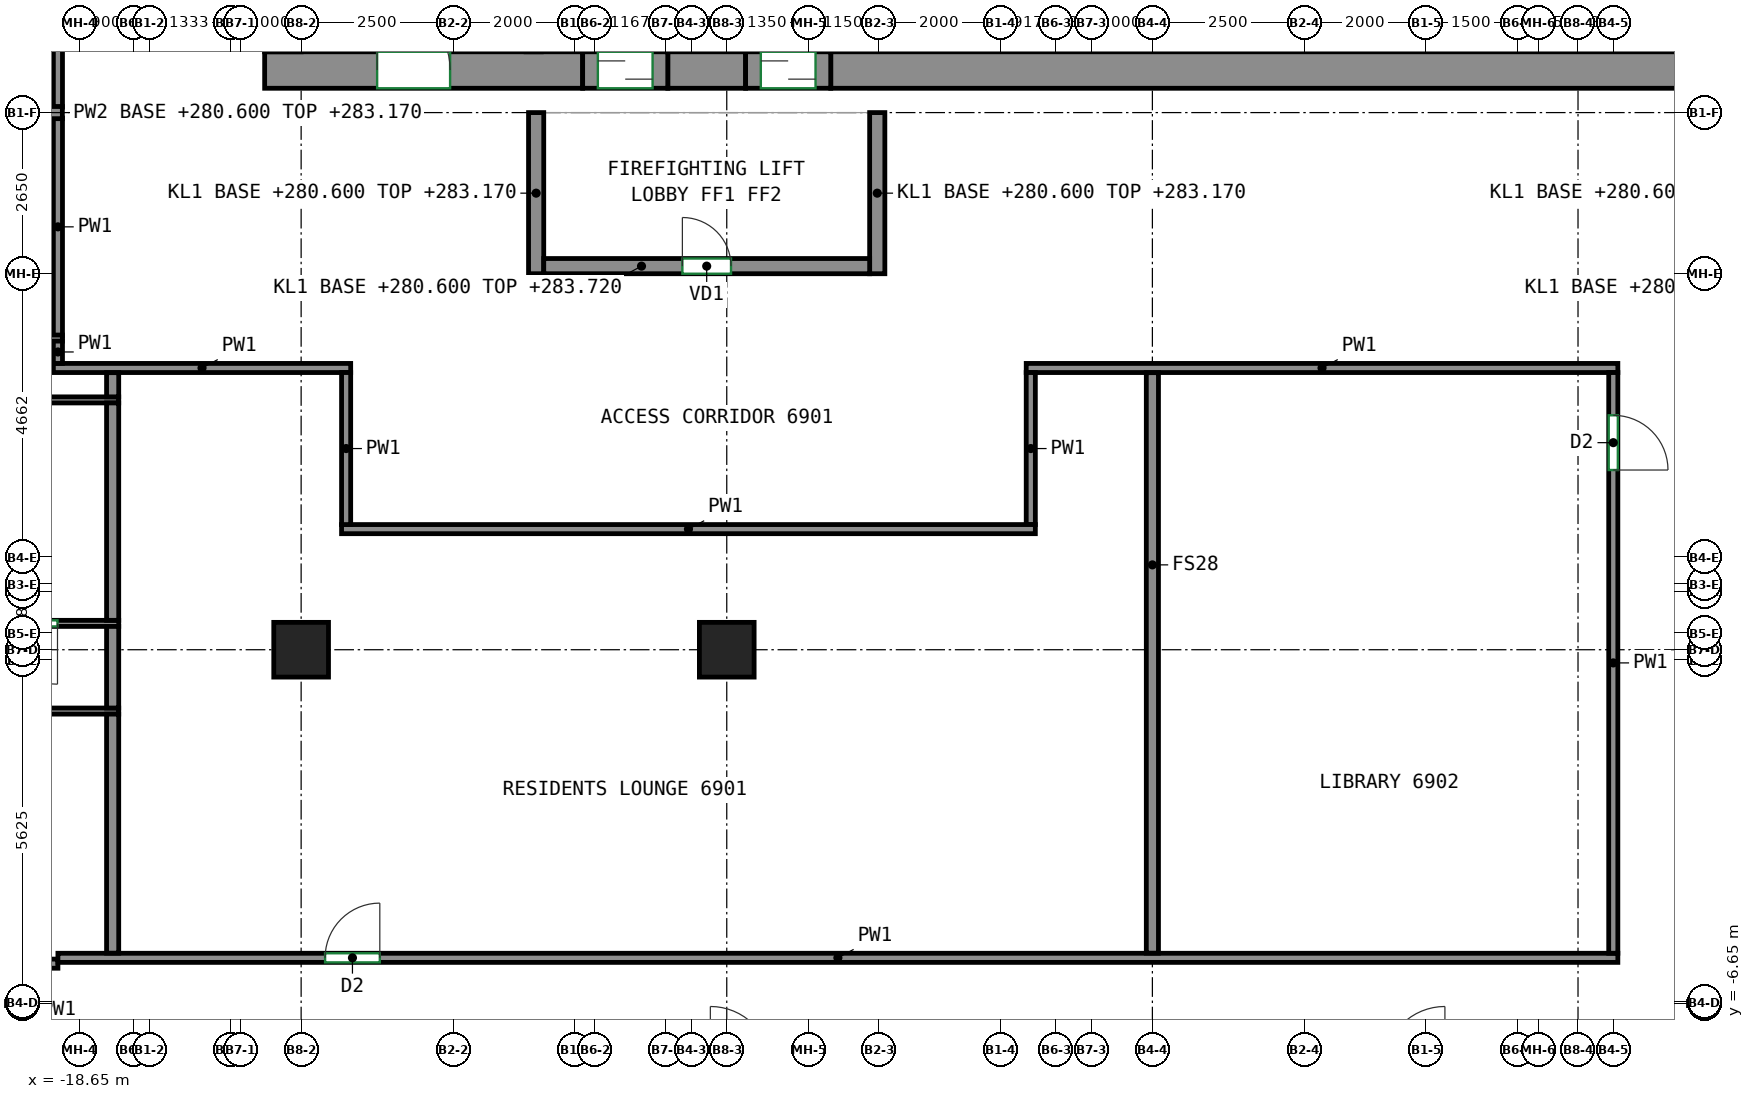
"""IFC4 building model, lengths in metres.
Left out: names, types, materials, properties, quantities, classifications, styles, units other than length and angle.
Written with IfcOpenShell. Run it as: python <this file> out.ifc"""

import sys

from ifc_helpers import new_model, si_unit, direction, frame, frame_2d, origin, origin_2d, place, context, subcontext, project, spatial, rectangle, extrude, source, transform, mapped, element, fill, save


model = new_model("IFC4")
c1 = context("Model", 3, precision=1e-05, world=origin(), true_north=direction((0.0, 1.0)))
c2 = subcontext(c1, "Body", "Model", "MODEL_VIEW")
j1 = project(units=[si_unit("LENGTHUNIT", "METRE"), si_unit("PLANEANGLEUNIT", "RADIAN")], contexts=[c1])
p1 = place(None, origin())
s1 = spatial("IfcSite", under=j1, at=p1, CompositionType="ELEMENT")
p2 = place(p1, origin())
s2 = spatial("IfcBuilding", under=s1, at=p2, CompositionType="ELEMENT")
p3 = place(p2, frame((0.0, 0.0, 280.6)))
s3 = spatial("IfcBuildingStorey", under=s2, at=p3, CompositionType="ELEMENT", Elevation=280.6)
m1 = source(origin(), c2, "Body", "SweptSolid", [
    extrude(rectangle(XDim=0.9, YDim=0.9, at=origin_2d()), origin(), (0.0, 0.0, 1.0), 3.12),
])
for number, where, z_axis, x_axis in (
    (1, (-15.0, -0.833, 0.0), (0.0, 0.0, 1.0), (1.0, 0.0, 0.0)),
    (2, (-8.0, -0.833, 0.0), (0.0, 0.0, 1.0), (1.0, 0.0, 0.0)),
):
    element("IfcColumn", number, at=place(p3, frame(where, z_axis=z_axis, x_axis=x_axis)), inside=s3, PredefinedType="COLUMN", context=c2, shape_type="MappedRepresentation", body=[
        mapped(m1, transform((0.0, 0.0, 0.0))),
    ])
m2 = source(origin(), c2, "Body", "SweptSolid", [
    extrude(rectangle(XDim=5.23, YDim=0.6, at=frame_2d((2.615, 0.0))), origin(), (0.0, 0.0, 1.0), 3.12),
])
p4 = place(p3, frame((-15.6, 8.7, 0.0), z_axis=(0.0, 0.0, 1.0), x_axis=(1.0, 0.0, 0.0)))
e3 = element("IfcWall", 3, at=p4, inside=s3, PredefinedType="SHEAR", context=c2, shape_type="MappedRepresentation", body=[
    mapped(m2, transform((0.0, 0.0, 0.0))),
])
p5 = place(p4, frame((1.85, 0.0, 0.0)))
e4 = element("IfcOpeningElement", 4, at=p5, cuts=e3, PredefinedType="OPENING", context=c2, shape_type="SweptSolid", body=[
    extrude(rectangle(XDim=1.2, YDim=2.1, at=frame_2d((0.6, 1.05))), frame((0.0, 0.31, 0.0), z_axis=(0.0, -1.0, 0.0), x_axis=(1.0, 0.0, 0.0)), (0.0, 0.0, 1.0), 0.62),
])
m3 = source(origin(), c2, "Body", "SweptSolid", [
    extrude(rectangle(XDim=1.28, YDim=0.6, at=frame_2d((0.64, 0.0))), origin(), (0.0, 0.0, 1.0), 3.12),
])
p6 = place(p3, frame((-8.97, 8.7, 0.0), z_axis=(0.0, 0.0, 1.0), x_axis=(1.0, 0.0, 0.0)))
e5 = element("IfcWall", 5, at=p6, inside=s3, PredefinedType="SHEAR", context=c2, shape_type="MappedRepresentation", body=[
    mapped(m3, transform((0.0, 0.0, 0.0))),
])
m4 = source(origin(), c2, "Body", "SweptSolid", [
    extrude(rectangle(XDim=14.18, YDim=0.6, at=frame_2d((7.09, 0.0))), origin(), (0.0, 0.0, 1.0), 3.12),
])
p7 = place(p3, frame((-6.29, 8.7, 0.0), z_axis=(0.0, 0.0, 1.0), x_axis=(1.0, 0.0, 0.0)))
e6 = element("IfcWall", 6, at=p7, inside=s3, PredefinedType="SHEAR", context=c2, shape_type="MappedRepresentation", body=[
    mapped(m4, transform((0.0, 0.0, 0.0))),
])
m5 = source(origin(), c2, "Body", "SweptSolid", [
    extrude(rectangle(XDim=2.65, YDim=0.25, at=frame_2d((1.325, 0.0))), origin(), (0.0, 0.0, 1.0), 2.57),
])
for number, where, z_axis, x_axis in (
    (7, (-11.135, 5.35, 0.0), (0.0, 0.0, 1.0), (0.0, 1.0, 0.0)),
    (8, (-5.525, 5.35, 0.0), (0.0, 0.0, 1.0), (0.0, 1.0, 0.0)),
):
    element("IfcWall", number, at=place(p3, frame(where, z_axis=z_axis, x_axis=x_axis)), inside=s3, PredefinedType="PARTITIONING", context=c2, shape_type="MappedRepresentation", body=[
        mapped(m5, transform((0.0, 0.0, 0.0))),
    ])
m6 = source(origin(), c2, "Body", "SweptSolid", [
    extrude(rectangle(XDim=5.36, YDim=0.25, at=frame_2d((2.68, 0.0))), origin(), (0.0, 0.0, 1.0), 3.12),
])
p8 = place(p3, frame((-11.01, 5.475, 0.0), z_axis=(0.0, 0.0, 1.0), x_axis=(1.0, 0.0, 0.0)))
e9 = element("IfcWall", 9, at=p8, inside=s3, PredefinedType="PARTITIONING", context=c2, shape_type="MappedRepresentation", body=[
    mapped(m6, transform((0.0, 0.0, 0.0))),
])
p9 = place(p8, frame((2.28, 0.0, 0.0)))
e10 = element("IfcOpeningElement", 10, at=p9, cuts=e9, PredefinedType="OPENING", context=c2, shape_type="SweptSolid", body=[
    extrude(rectangle(XDim=0.8, YDim=2.0, at=frame_2d((0.4, 1.0))), frame((0.0, 0.135, 0.0), z_axis=(0.0, -1.0, 0.0), x_axis=(1.0, 0.0, 0.0)), (0.0, 0.0, 1.0), 0.27),
])
m7 = source(origin(), c2, "Body", "SweptSolid", [
    extrude(rectangle(XDim=1.4, YDim=0.6, at=frame_2d((0.7, 0.0))), origin(), (0.0, 0.0, 1.0), 2.7),
])
p10 = place(p3, frame((-10.37, 8.7, 0.0), z_axis=(0.0, 0.0, 1.0), x_axis=(1.0, 0.0, 0.0)))
e11 = element("IfcWall", 11, at=p10, inside=s3, PredefinedType="PARTITIONING", context=c2, shape_type="MappedRepresentation", body=[
    mapped(m7, transform((0.0, 0.0, 0.0))),
])
p11 = place(p10, frame((0.25, 0.0, 0.0)))
e12 = element("IfcOpeningElement", 12, at=p11, cuts=e11, PredefinedType="OPENING", context=c2, shape_type="SweptSolid", body=[
    extrude(rectangle(XDim=0.9, YDim=2.1, at=frame_2d((0.45, 1.05))), frame((0.0, 0.31, 0.0), z_axis=(0.0, -1.0, 0.0), x_axis=(1.0, 0.0, 0.0)), (0.0, 0.0, 1.0), 0.62),
])
m8 = source(origin(), c2, "Body", "SweptSolid", [
    extrude(rectangle(XDim=1.4, YDim=0.6, at=frame_2d((0.7, 0.0))), origin(), (0.0, 0.0, 1.0), 2.7),
])
p12 = place(p3, frame((-7.69, 8.7, 0.0), z_axis=(0.0, 0.0, 1.0), x_axis=(1.0, 0.0, 0.0)))
e13 = element("IfcWall", 13, at=p12, inside=s3, PredefinedType="PARTITIONING", context=c2, shape_type="MappedRepresentation", body=[
    mapped(m8, transform((0.0, 0.0, 0.0))),
])
p13 = place(p12, frame((0.25, 0.0, 0.0)))
e14 = element("IfcOpeningElement", 14, at=p13, cuts=e13, PredefinedType="OPENING", context=c2, shape_type="SweptSolid", body=[
    extrude(rectangle(XDim=0.9, YDim=2.1, at=frame_2d((0.45, 1.05))), frame((0.0, 0.31, 0.0), z_axis=(0.0, -1.0, 0.0), x_axis=(1.0, 0.0, 0.0)), (0.0, 0.0, 1.0), 0.62),
])
p14 = place(p3, frame((-19.0, -5.996, 0.0), z_axis=(0.0, 0.0, 1.0), x_axis=(-1.0, 0.0, 0.0)))
e15 = element("IfcWall", 15, at=p14, inside=s3, PredefinedType="PARTITIONING", context=c2, shape_type="SweptSolid", body=[
    extrude(rectangle(XDim=0.677, YDim=0.15, at=frame_2d((0.338, 0.0))), origin(), (0.0, 0.0, 1.0), 3.12),
])
p15 = place(p3, frame((-19.0, -5.9, 0.0), z_axis=(0.0, 0.0, 1.0), x_axis=(1.0, 0.0, 0.0)))
e16 = element("IfcWall", 16, at=p15, inside=s3, PredefinedType="PARTITIONING", context=c2, shape_type="SweptSolid", body=[
    extrude(rectangle(XDim=25.655, YDim=0.15, at=frame_2d((12.828, 0.0))), origin(), (0.0, 0.0, 1.0), 3.12),
])
p16 = place(p15, frame((4.394, 0.0, 0.0)))
e17 = element("IfcOpeningElement", 17, at=p16, cuts=e16, PredefinedType="OPENING", context=c2, shape_type="SweptSolid", body=[
    extrude(rectangle(XDim=0.9, YDim=2.1, at=frame_2d((0.45, 1.05))), frame((0.0, 0.085, 0.0), z_axis=(0.0, -1.0, 0.0), x_axis=(1.0, 0.0, 0.0)), (0.0, 0.0, 1.0), 0.17),
])
p17 = place(p3, frame((-19.075, 3.8, 0.0), z_axis=(0.0, 0.0, 1.0), x_axis=(1.0, 0.0, 0.0)))
e18 = element("IfcWall", 18, at=p17, inside=s3, PredefinedType="PARTITIONING", context=c2, shape_type="SweptSolid", body=[
    extrude(rectangle(XDim=4.89, YDim=0.15, at=frame_2d((2.445, 0.0))), origin(), (0.0, 0.0, 1.0), 3.12),
])
p18 = place(p3, frame((-19.0, 3.875, 0.0), z_axis=(0.0, 0.0, 1.0), x_axis=(0.0, 1.0, 0.0)))
e19 = element("IfcWall", 19, at=p18, inside=s3, PredefinedType="PARTITIONING", context=c2, shape_type="SweptSolid", body=[
    extrude(rectangle(XDim=0.377, YDim=0.15, at=frame_2d((0.188, 0.0))), origin(), (0.0, 0.0, 1.0), 3.12),
])
p19 = place(p3, frame((-19.0, 4.332, 0.0), z_axis=(0.0, 0.0, 1.0), x_axis=(0.0, 1.0, 0.0)))
e20 = element("IfcWall", 20, at=p19, inside=s3, PredefinedType="PARTITIONING", context=c2, shape_type="SweptSolid", body=[
    extrude(rectangle(XDim=3.578, YDim=0.15, at=frame_2d((1.789, 0.0))), origin(), (0.0, 0.0, 1.0), 3.12),
])
p20 = place(p3, frame((-19.0, 8.09, 0.0), z_axis=(0.0, 0.0, 1.0), x_axis=(0.0, 1.0, 0.0)))
e21 = element("IfcWall", 21, at=p20, inside=s3, PredefinedType="PARTITIONING", context=c2, shape_type="SweptSolid", body=[
    extrude(rectangle(XDim=9.67, YDim=0.15, at=frame_2d((4.835, 0.0))), origin(), (0.0, 0.0, 1.0), 3.12),
])
p21 = place(p20, frame((3.629, 0.0, 0.0)))
e22 = element("IfcOpeningElement", 22, at=p21, cuts=e21, PredefinedType="OPENING", context=c2, shape_type="SweptSolid", body=[
    extrude(rectangle(XDim=1.0, YDim=2.1, at=frame_2d((0.5, 1.05))), frame((0.0, 0.085, 0.0), z_axis=(0.0, -1.0, 0.0), x_axis=(1.0, 0.0, 0.0)), (0.0, 0.0, 1.0), 0.17),
])
p22 = place(p3, frame((-3.075, 3.8, 0.0), z_axis=(0.0, 0.0, 1.0), x_axis=(1.0, 0.0, 0.0)))
e23 = element("IfcWall", 23, at=p22, inside=s3, PredefinedType="PARTITIONING", context=c2, shape_type="SweptSolid", body=[
    extrude(rectangle(XDim=9.73, YDim=0.15, at=frame_2d((4.865, 0.0))), origin(), (0.0, 0.0, 1.0), 3.12),
])
p23 = place(p3, frame((-3.0, 1.225, 0.0), z_axis=(0.0, 0.0, 1.0), x_axis=(0.0, 1.0, 0.0)))
e24 = element("IfcWall", 24, at=p23, inside=s3, PredefinedType="PARTITIONING", context=c2, shape_type="SweptSolid", body=[
    extrude(rectangle(XDim=2.5, YDim=0.15, at=frame_2d((1.25, 0.0))), origin(), (0.0, 0.0, 1.0), 3.12),
])
p24 = place(p3, frame((-14.335, 1.15, 0.0), z_axis=(0.0, 0.0, 1.0), x_axis=(1.0, 0.0, 0.0)))
e25 = element("IfcWall", 25, at=p24, inside=s3, PredefinedType="PARTITIONING", context=c2, shape_type="SweptSolid", body=[
    extrude(rectangle(XDim=11.41, YDim=0.15, at=frame_2d((5.705, 0.0))), origin(), (0.0, 0.0, 1.0), 3.12),
])
p25 = place(p3, frame((-14.26, 3.725, 0.0), z_axis=(0.0, 0.0, 1.0), x_axis=(0.0, -1.0, 0.0)))
e26 = element("IfcWall", 26, at=p25, inside=s3, PredefinedType="PARTITIONING", context=c2, shape_type="SweptSolid", body=[
    extrude(rectangle(XDim=2.5, YDim=0.15, at=frame_2d((1.25, 0.0))), origin(), (0.0, 0.0, 1.0), 3.12),
])
p26 = place(p3, frame((6.58, 3.725, 0.0), z_axis=(0.0, 0.0, 1.0), x_axis=(0.0, -1.0, 0.0)))
e27 = element("IfcWall", 27, at=p26, inside=s3, PredefinedType="PARTITIONING", context=c2, shape_type="SweptSolid", body=[
    extrude(rectangle(XDim=9.55, YDim=0.15, at=frame_2d((4.775, 0.0))), origin(), (0.0, 0.0, 1.0), 3.12),
])
p27 = place(p26, frame((0.703, 0.0, 0.0)))
e28 = element("IfcOpeningElement", 28, at=p27, cuts=e27, PredefinedType="OPENING", context=c2, shape_type="SweptSolid", body=[
    extrude(rectangle(XDim=0.9, YDim=2.1, at=frame_2d((0.45, 1.05))), frame((0.0, 0.085, 0.0), z_axis=(0.0, -1.0, 0.0), x_axis=(1.0, 0.0, 0.0)), (0.0, 0.0, 1.0), 0.17),
])
p28 = place(p3, frame((-18.0, -1.842, 0.0), z_axis=(0.0, 0.0, 1.0), x_axis=(-1.0, 0.0, 0.0)))
e29 = element("IfcWall", 29, at=p28, inside=s3, PredefinedType="PARTITIONING", context=c2, shape_type="SweptSolid", body=[
    extrude(rectangle(XDim=7.25, YDim=0.1, at=frame_2d((3.625, 0.0))), origin(), (0.0, 0.0, 1.0), 3.12),
])
p29 = place(p28, frame((4.133, 0.0, 0.0)))
e30 = element("IfcOpeningElement", 30, at=p29, cuts=e29, PredefinedType="OPENING", context=c2, shape_type="SweptSolid", body=[
    extrude(rectangle(XDim=0.9, YDim=2.1, at=frame_2d((0.45, 1.05))), frame((0.0, 0.06, 0.0), z_axis=(0.0, -1.0, 0.0), x_axis=(1.0, 0.0, 0.0)), (0.0, 0.0, 1.0), 0.12),
])
p30 = place(p3, frame((-18.1, -5.823, 0.0), z_axis=(0.0, 0.0, 1.0), x_axis=(0.0, 1.0, 0.0)))
e31 = element("IfcWall", 31, at=p30, inside=s3, PredefinedType="PARTITIONING", context=c2, shape_type="SweptSolid", body=[
    extrude(rectangle(XDim=3.931, YDim=0.2, at=frame_2d((1.965, 0.0))), origin(), (0.0, 0.0, 1.0), 3.12),
])
p31 = place(p3, frame((-18.0, -0.4, 0.0), z_axis=(0.0, 0.0, 1.0), x_axis=(-1.0, 0.0, 0.0)))
e32 = element("IfcWall", 32, at=p31, inside=s3, PredefinedType="PARTITIONING", context=c2, shape_type="SweptSolid", body=[
    extrude(rectangle(XDim=7.25, YDim=0.1, at=frame_2d((3.625, 0.0))), origin(), (0.0, 0.0, 1.0), 3.12),
])
p32 = place(p31, frame((1.007, 0.0, 0.0)))
e33 = element("IfcOpeningElement", 33, at=p32, cuts=e32, PredefinedType="OPENING", context=c2, shape_type="SweptSolid", body=[
    extrude(rectangle(XDim=1.0, YDim=2.1, at=frame_2d((0.5, 1.05))), frame((0.0, 0.06, 0.0), z_axis=(0.0, -1.0, 0.0), x_axis=(1.0, 0.0, 0.0)), (0.0, 0.0, 1.0), 0.12),
])
p33 = place(p3, frame((-18.1, -1.792, 0.0), z_axis=(0.0, 0.0, 1.0), x_axis=(0.0, 1.0, 0.0)))
e34 = element("IfcWall", 34, at=p33, inside=s3, PredefinedType="PARTITIONING", context=c2, shape_type="SweptSolid", body=[
    extrude(rectangle(XDim=1.342, YDim=0.2, at=frame_2d((0.671, 0.0))), origin(), (0.0, 0.0, 1.0), 3.12),
])
p34 = place(p3, frame((-18.0, 3.275, 0.0), z_axis=(0.0, 0.0, 1.0), x_axis=(-1.0, 0.0, 0.0)))
e35 = element("IfcWall", 35, at=p34, inside=s3, PredefinedType="PARTITIONING", context=c2, shape_type="SweptSolid", body=[
    extrude(rectangle(XDim=7.25, YDim=0.1, at=frame_2d((3.625, 0.0))), origin(), (0.0, 0.0, 1.0), 3.12),
])
p35 = place(p34, frame((6.049, 0.0, 0.0)))
e36 = element("IfcOpeningElement", 36, at=p35, cuts=e35, PredefinedType="OPENING", context=c2, shape_type="SweptSolid", body=[
    extrude(rectangle(XDim=0.9, YDim=2.1, at=frame_2d((0.45, 1.05))), frame((0.0, 0.06, 0.0), z_axis=(0.0, -1.0, 0.0), x_axis=(1.0, 0.0, 0.0)), (0.0, 0.0, 1.0), 0.12),
])
p36 = place(p3, frame((-18.1, -0.35, 0.0), z_axis=(0.0, 0.0, 1.0), x_axis=(0.0, 1.0, 0.0)))
e37 = element("IfcWall", 37, at=p36, inside=s3, PredefinedType="PARTITIONING", context=c2, shape_type="SweptSolid", body=[
    extrude(rectangle(XDim=3.575, YDim=0.2, at=frame_2d((1.788, 0.0))), origin(), (0.0, 0.0, 1.0), 3.12),
])
p37 = place(p3, frame((-18.927, 4.292, 0.0), z_axis=(0.0, 0.0, 1.0), x_axis=(-1.0, 0.0, 0.0)))
e38 = element("IfcWall", 38, at=p37, inside=s3, PredefinedType="PARTITIONING", context=c2, shape_type="SweptSolid", body=[
    extrude(rectangle(XDim=6.323, YDim=0.1, at=frame_2d((3.162, 0.0))), origin(), (0.0, 0.0, 1.0), 3.12),
])
p38 = place(p37, frame((2.712, 0.0, 0.0)))
e39 = element("IfcOpeningElement", 39, at=p38, cuts=e38, PredefinedType="OPENING", context=c2, shape_type="SweptSolid", body=[
    extrude(rectangle(XDim=0.9, YDim=2.1, at=frame_2d((0.45, 1.05))), frame((0.0, 0.06, 0.0), z_axis=(0.0, -1.0, 0.0), x_axis=(1.0, 0.0, 0.0)), (0.0, 0.0, 1.0), 0.12),
])
p39 = place(p3, frame((-18.1, 3.325, 0.0), z_axis=(0.0, 0.0, 1.0), x_axis=(0.0, 1.0, 0.0)))
e40 = element("IfcWall", 40, at=p39, inside=s3, PredefinedType="PARTITIONING", context=c2, shape_type="SweptSolid", body=[
    extrude(rectangle(XDim=0.398, YDim=0.2, at=frame_2d((0.199, 0.0))), origin(), (0.0, 0.0, 1.0), 3.12),
])
p40 = place(p3, frame((-24.725, 8.0, 0.0), z_axis=(0.0, 0.0, 1.0), x_axis=(1.0, 0.0, 0.0)))
e41 = element("IfcWall", 41, at=p40, inside=s3, PredefinedType="PARTITIONING", context=c2, shape_type="SweptSolid", body=[
    extrude(rectangle(XDim=5.798, YDim=0.2, at=frame_2d((2.899, 0.0))), origin(), (0.0, 0.0, 1.0), 2.57),
])
p41 = place(p3, frame((-1.0, -5.823, 0.0), z_axis=(0.0, 0.0, 1.0), x_axis=(0.0, 1.0, 0.0)))
e42 = element("IfcWall", 42, at=p41, inside=s3, PredefinedType="PARTITIONING", context=c2, shape_type="SweptSolid", body=[
    extrude(rectangle(XDim=9.546, YDim=0.2, at=frame_2d((4.773, 0.0))), origin(), (0.0, 0.0, 1.0), 3.12),
])
p42 = place(p9, origin())
e43 = element("IfcDoor", 43, at=p42, inside=s3, OperationType="SINGLE_SWING_LEFT", PredefinedType="DOOR", context=c2, shape_type="SweptSolid", body=[
    extrude(rectangle(XDim=0.8, YDim=2.0, at=frame_2d((0.4, 1.0))), frame((0.0, 0.025, 0.0), z_axis=(0.0, -1.0, 0.0), x_axis=(1.0, 0.0, 0.0)), (0.0, 0.0, 1.0), 0.05),
])
fill(e10, e43)
p43 = place(p11, origin())
e44 = element("IfcDoor", 44, at=p43, inside=s3, OperationType="SLIDING_TO_LEFT", PredefinedType="DOOR", context=c2, shape_type="SweptSolid", body=[
    extrude(rectangle(XDim=0.9, YDim=2.1, at=frame_2d((0.45, 1.05))), frame((0.0, 0.205, 0.0), z_axis=(0.0, -1.0, 0.0), x_axis=(1.0, 0.0, 0.0)), (0.0, 0.0, 1.0), 0.05),
])
fill(e12, e44)
p44 = place(p13, origin())
e45 = element("IfcDoor", 45, at=p44, inside=s3, OperationType="SLIDING_TO_RIGHT", PredefinedType="DOOR", context=c2, shape_type="SweptSolid", body=[
    extrude(rectangle(XDim=0.9, YDim=2.1, at=frame_2d((0.45, 1.05))), frame((0.0, 0.205, 0.0), z_axis=(0.0, -1.0, 0.0), x_axis=(1.0, 0.0, 0.0)), (0.0, 0.0, 1.0), 0.05),
])
fill(e14, e45)
p45 = place(p5, origin())
e46 = element("IfcDoor", 46, at=p45, inside=s3, OperationType="DOUBLE_DOOR_SINGLE_SWING", PredefinedType="DOOR", context=c2, shape_type="SweptSolid", body=[
    extrude(rectangle(XDim=1.2, YDim=2.1, at=frame_2d((0.6, 1.05))), frame((0.0, 0.205, 0.0), z_axis=(0.0, -1.0, 0.0), x_axis=(1.0, 0.0, 0.0)), (0.0, 0.0, 1.0), 0.05),
])
fill(e4, e46)
p46 = place(p16, origin())
e47 = element("IfcDoor", 47, at=p46, inside=s3, OperationType="SINGLE_SWING_RIGHT", PredefinedType="DOOR", context=c2, shape_type="SweptSolid", body=[
    extrude(rectangle(XDim=0.9, YDim=2.1, at=frame_2d((0.45, 1.05))), frame((0.0, 0.025, 0.0), z_axis=(0.0, -1.0, 0.0), x_axis=(1.0, 0.0, 0.0)), (0.0, 0.0, 1.0), 0.05),
])
fill(e17, e47)
p47 = place(p32, origin())
e48 = element("IfcDoor", 48, at=p47, inside=s3, OperationType="SINGLE_SWING_LEFT", PredefinedType="DOOR", context=c2, shape_type="SweptSolid", body=[
    extrude(rectangle(XDim=1.0, YDim=2.1, at=frame_2d((0.5, 1.05))), frame((0.0, 0.025, 0.0), z_axis=(0.0, -1.0, 0.0), x_axis=(1.0, 0.0, 0.0)), (0.0, 0.0, 1.0), 0.05),
])
fill(e33, e48)
p48 = place(p27, origin())
e49 = element("IfcDoor", 49, at=p48, inside=s3, OperationType="SINGLE_SWING_RIGHT", PredefinedType="DOOR", context=c2, shape_type="SweptSolid", body=[
    extrude(rectangle(XDim=0.9, YDim=2.1, at=frame_2d((0.45, 1.05))), frame((0.0, 0.025, 0.0), z_axis=(0.0, -1.0, 0.0), x_axis=(1.0, 0.0, 0.0)), (0.0, 0.0, 1.0), 0.05),
])
fill(e28, e49)
save(model, sys.argv[1])
